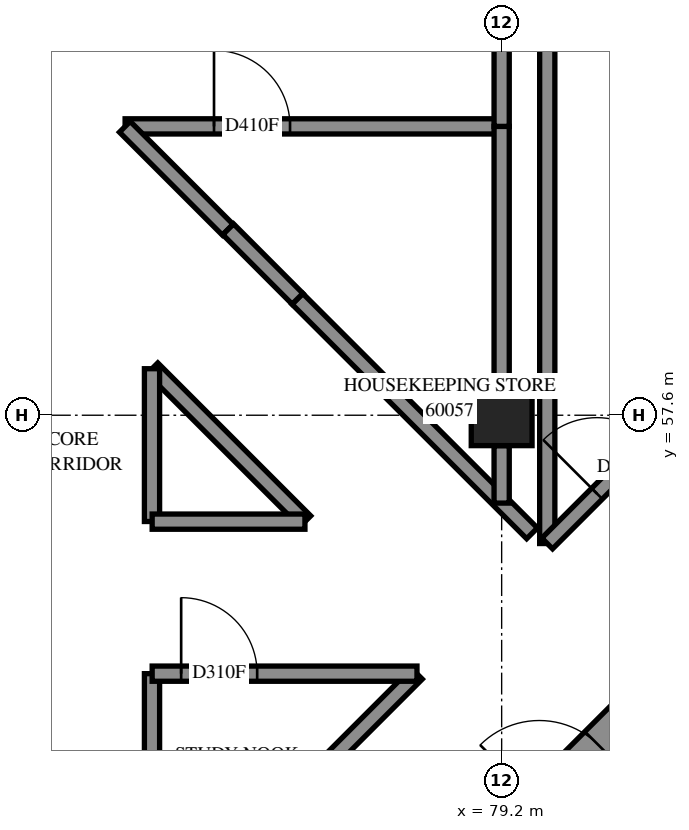
"""IFC4 building model, lengths in metres.
Left out: names, types, materials, properties, quantities, classifications, styles, units other than length and angle.
Written with IfcOpenShell. Run it as: python <this file> out.ifc"""

import sys

from ifc_helpers import new_model, si_unit, direction, frame, frame_2d, origin, origin_2d, place, context, subcontext, project, spatial, rectangle, extrude, element, fill, save


model = new_model("IFC4")
c1 = context("Model", 3, precision=1e-05, world=origin(), true_north=direction((0.0, 1.0)))
c2 = subcontext(c1, "Body", "Model", "MODEL_VIEW")
j1 = project(units=[si_unit("LENGTHUNIT", "METRE"), si_unit("PLANEANGLEUNIT", "RADIAN")], contexts=[c1])
p1 = place(None, origin())
s1 = spatial("IfcSite", under=j1, at=p1, CompositionType="ELEMENT")
p2 = place(p1, origin())
s2 = spatial("IfcBuilding", under=s1, at=p2, CompositionType="ELEMENT")
p3 = place(p2, frame((0.0, 0.0, 220.2)))
s3 = spatial("IfcBuildingStorey", under=s2, at=p3, CompositionType="ELEMENT", Elevation=220.2)
p4 = place(p3, frame((79.2, 57.6, 0.0), z_axis=(0.0, 0.0, 1.0), x_axis=(1.0, 0.0, 0.0)))
e1 = element("IfcColumn", 1, at=p4, inside=s3, PredefinedType="COLUMN", context=c2, shape_type="SweptSolid", body=[
    extrude(rectangle(XDim=0.8, YDim=0.8, at=origin_2d()), origin(), (0.0, 0.0, 1.0), 3.1),
])
p5 = place(p3, frame((76.478, 49.267, -0.3), z_axis=(0.0, 0.0, 1.0), x_axis=(0.7071067812, 0.7071067812, 0.0)))
e2 = element("IfcWall", 2, at=p5, inside=s3, PredefinedType="SHEAR", context=c2, shape_type="SweptSolid", body=[
    extrude(rectangle(XDim=14.4, YDim=0.5, at=frame_2d((7.2, 0.0))), origin(), (0.0, 0.0, 1.0), 2.7),
])
p6 = place(p5, frame((4.55, 0.0, 0.3)))
e3 = element("IfcOpeningElement", 3, at=p6, cuts=e2, PredefinedType="OPENING", context=c2, shape_type="SweptSolid", body=[
    extrude(rectangle(XDim=1.1, YDim=2.1, at=frame_2d((0.55, 1.05))), frame((0.0, 0.26, 0.0), z_axis=(0.0, -1.0, 0.0), x_axis=(1.0, 0.0, 0.0)), (0.0, 0.0, 1.0), 0.52),
])
p7 = place(p5, frame((11.35, 0.0, 0.3)))
e4 = element("IfcOpeningElement", 4, at=p7, cuts=e2, PredefinedType="OPENING", context=c2, shape_type="SweptSolid", body=[
    extrude(rectangle(XDim=1.1, YDim=2.1, at=frame_2d((0.55, 1.05))), frame((0.0, 0.26, 0.0), z_axis=(0.0, -1.0, 0.0), x_axis=(1.0, 0.0, 0.0)), (0.0, 0.0, 1.0), 0.52),
])
p8 = place(p3, frame((79.8, 55.912, 0.0), z_axis=(0.0, 0.0, 1.0), x_axis=(0.0, 1.0, 0.0)))
e5 = element("IfcWall", 5, at=p8, inside=s3, PredefinedType="PARTITIONING", context=c2, shape_type="SweptSolid", body=[
    extrude(rectangle(XDim=11.596, YDim=0.2, at=frame_2d((5.798, 0.0))), origin(), (0.0, 0.0, 1.0), 3.1),
])
p9 = place(p3, frame((79.799, 55.913, 0.0), z_axis=(0.0, 0.0, 1.0), x_axis=(0.7071067812, 0.7071067812, 0.0)))
e6 = element("IfcWall", 6, at=p9, inside=s3, PredefinedType="PARTITIONING", context=c2, shape_type="SweptSolid", body=[
    extrude(rectangle(XDim=9.95, YDim=0.2, at=frame_2d((4.975, 0.0))), origin(), (0.0, 0.0, 1.0), 3.1),
])
p10 = place(p9, frame((0.927, 0.0, 0.0)))
e7 = element("IfcOpeningElement", 7, at=p10, cuts=e6, PredefinedType="OPENING", context=c2, shape_type="SweptSolid", body=[
    extrude(rectangle(XDim=1.0, YDim=2.1, at=frame_2d((0.5, 1.05))), frame((0.0, 0.11, 0.0), z_axis=(0.0, -1.0, 0.0), x_axis=(1.0, 0.0, 0.0)), (0.0, 0.0, 1.0), 0.22),
])
p11 = place(p3, frame((74.246, 61.4, 0.0), z_axis=(0.0, 0.0, 1.0), x_axis=(1.0, 0.0, 0.0)))
e8 = element("IfcWall", 8, at=p11, inside=s3, PredefinedType="PARTITIONING", context=c2, shape_type="SweptSolid", body=[
    extrude(rectangle(XDim=4.954, YDim=0.2, at=frame_2d((2.477, 0.0))), origin(), (0.0, 0.0, 1.0), 3.1),
])
p12 = place(p11, frame((1.17, 0.0, 0.0)))
e9 = element("IfcOpeningElement", 9, at=p12, cuts=e8, PredefinedType="OPENING", context=c2, shape_type="SweptSolid", body=[
    extrude(rectangle(XDim=1.0, YDim=2.1, at=frame_2d((0.5, 1.05))), frame((0.0, 0.11, 0.0), z_axis=(0.0, -1.0, 0.0), x_axis=(1.0, 0.0, 0.0)), (0.0, 0.0, 1.0), 0.22),
])
p13 = place(p3, frame((74.601, 50.715, 0.0), z_axis=(0.0, 0.0, 1.0), x_axis=(0.7071067812, 0.7071067812, 0.0)))
e10 = element("IfcWall", 10, at=p13, inside=s3, PredefinedType="PARTITIONING", context=c2, shape_type="SweptSolid", body=[
    extrude(rectangle(XDim=4.927, YDim=0.2, at=frame_2d((2.464, 0.0))), origin(), (0.0, 0.0, 1.0), 3.1),
])
p14 = place(p3, frame((76.513, 59.131, 0.0), z_axis=(0.0, 0.0, 1.0), x_axis=(0.7073587997, -0.7068546728, 0.0)))
e11 = element("IfcWall", 11, at=p14, inside=s3, PredefinedType="PARTITIONING", context=c2, shape_type="SweptSolid", body=[
    extrude(rectangle(XDim=4.364, YDim=0.2, at=frame_2d((2.182, 0.0))), origin(), (0.0, 0.0, 1.0), 3.1),
])
p15 = place(p3, frame((74.6, 50.714, 0.0), z_axis=(0.0, 0.0, 1.0), x_axis=(0.0, 1.0, 0.0)))
e12 = element("IfcWall", 12, at=p15, inside=s3, PredefinedType="PARTITIONING", context=c2, shape_type="SweptSolid", body=[
    extrude(rectangle(XDim=3.486, YDim=0.2, at=frame_2d((1.743, 0.0))), origin(), (0.0, 0.0, 1.0), 3.1),
])
p16 = place(p3, frame((74.602, 54.2, 0.0), z_axis=(0.0, 0.0, 1.0), x_axis=(1.0, 0.0, 0.0)))
e13 = element("IfcWall", 13, at=p16, inside=s3, PredefinedType="PARTITIONING", context=c2, shape_type="SweptSolid", body=[
    extrude(rectangle(XDim=3.484, YDim=0.2, at=frame_2d((1.742, 0.0))), origin(), (0.0, 0.0, 1.0), 3.1),
])
p17 = place(p16, frame((0.382, 0.0, 0.0)))
e14 = element("IfcOpeningElement", 14, at=p17, cuts=e13, PredefinedType="OPENING", context=c2, shape_type="SweptSolid", body=[
    extrude(rectangle(XDim=1.0, YDim=2.1, at=frame_2d((0.5, 1.05))), frame((0.0, 0.11, 0.0), z_axis=(0.0, -1.0, 0.0), x_axis=(1.0, 0.0, 0.0)), (0.0, 0.0, 1.0), 0.22),
])
p18 = place(p3, frame((79.2, 58.0, 0.0), z_axis=(0.0, 0.0, 1.0), x_axis=(0.0, 1.0, 0.0)))
e15 = element("IfcWall", 15, at=p18, inside=s3, PredefinedType="PARTITIONING", context=c2, shape_type="SweptSolid", body=[
    extrude(rectangle(XDim=3.4, YDim=0.2, at=frame_2d((1.7, 0.0))), origin(), (0.0, 0.0, 1.0), 3.1),
])
p19 = place(p3, frame((74.606, 58.218, 0.0), z_axis=(0.0, 0.0, 1.0), x_axis=(0.7071067812, -0.7071067812, 0.0)))
e16 = element("IfcWall", 16, at=p19, inside=s3, PredefinedType="PARTITIONING", context=c2, shape_type="SweptSolid", body=[
    extrude(rectangle(XDim=2.845, YDim=0.2, at=frame_2d((1.423, 0.0))), origin(), (0.0, 0.0, 1.0), 3.1),
])
for number, where, z_axis, x_axis in (
    (17, (74.6, 56.202, 0.0), (0.0, 0.0, 1.0), (0.0, 1.0, 0.0)),
    (18, (74.602, 56.2, 0.0), (0.0, 0.0, 1.0), (1.0, 0.0, 0.0)),
):
    element("IfcWall", number, at=place(p3, frame(where, z_axis=z_axis, x_axis=x_axis)), inside=s3, PredefinedType="PARTITIONING", context=c2, shape_type="SweptSolid", body=[
        extrude(rectangle(XDim=2.01, YDim=0.2, at=frame_2d((1.005, 0.0))), origin(), (0.0, 0.0, 1.0), 3.1),
    ])
p20 = place(p3, frame((79.2, 61.4, 0.0), z_axis=(0.0, 0.0, 1.0), x_axis=(0.0, 1.0, 0.0)))
e19 = element("IfcWall", 19, at=p20, inside=s3, PredefinedType="PARTITIONING", context=c2, shape_type="SweptSolid", body=[
    extrude(rectangle(XDim=2.0, YDim=0.2, at=frame_2d((1.0, 0.0))), origin(), (0.0, 0.0, 1.0), 3.1),
])
p21 = place(p3, frame((74.243, 61.395, 0.0), z_axis=(0.0, 0.0, 1.0), x_axis=(0.7071067812, -0.7071067812, 0.0)))
e20 = element("IfcWall", 20, at=p21, inside=s3, PredefinedType="PARTITIONING", context=c2, shape_type="SweptSolid", body=[
    extrude(rectangle(XDim=1.915, YDim=0.2, at=frame_2d((0.957, 0.0))), origin(), (0.0, 0.0, 1.0), 3.1),
])
p22 = place(p3, frame((75.602, 60.046, 0.0), z_axis=(0.0, 0.0, 1.0), x_axis=(0.7063318703, -0.7078808437, 0.0)))
e21 = element("IfcWall", 21, at=p22, inside=s3, PredefinedType="PARTITIONING", context=c2, shape_type="SweptSolid", body=[
    extrude(rectangle(XDim=1.291, YDim=0.2, at=frame_2d((0.646, 0.0))), origin(), (0.0, 0.0, 1.0), 3.1),
])
p23 = place(p3, frame((79.2, 56.444, 0.0), z_axis=(0.0, 0.0, 1.0), x_axis=(0.0, 1.0, 0.0)))
e22 = element("IfcWall", 22, at=p23, inside=s3, PredefinedType="PARTITIONING", context=c2, shape_type="SweptSolid", body=[
    extrude(rectangle(XDim=0.756, YDim=0.2, at=frame_2d((0.378, 0.0))), origin(), (0.0, 0.0, 1.0), 3.1),
])
p24 = place(p6, origin())
e23 = element("IfcDoor", 23, at=p24, inside=s3, OperationType="DOUBLE_DOOR_SINGLE_SWING", PredefinedType="DOOR", context=c2, shape_type="SweptSolid", body=[
    extrude(rectangle(XDim=1.1, YDim=2.1, at=frame_2d((0.55, 1.05))), frame((0.0, 0.025, 0.0), z_axis=(0.0, -1.0, 0.0), x_axis=(1.0, 0.0, 0.0)), (0.0, 0.0, 1.0), 0.05),
])
fill(e3, e23)
p25 = place(p17, origin())
e24 = element("IfcDoor", 24, at=p25, inside=s3, OperationType="SINGLE_SWING_RIGHT", PredefinedType="DOOR", context=c2, shape_type="SweptSolid", body=[
    extrude(rectangle(XDim=1.0, YDim=2.1, at=frame_2d((0.5, 1.05))), frame((0.0, 0.025, 0.0), z_axis=(0.0, -1.0, 0.0), x_axis=(1.0, 0.0, 0.0)), (0.0, 0.0, 1.0), 0.05),
])
fill(e14, e24)
p26 = place(p12, origin())
e25 = element("IfcDoor", 25, at=p26, inside=s3, OperationType="SINGLE_SWING_RIGHT", PredefinedType="DOOR", context=c2, shape_type="SweptSolid", body=[
    extrude(rectangle(XDim=1.0, YDim=2.1, at=frame_2d((0.5, 1.05))), frame((0.0, 0.025, 0.0), z_axis=(0.0, -1.0, 0.0), x_axis=(1.0, 0.0, 0.0)), (0.0, 0.0, 1.0), 0.05),
])
fill(e9, e25)
p27 = place(p10, origin())
e26 = element("IfcDoor", 26, at=p27, inside=s3, OperationType="SINGLE_SWING_RIGHT", PredefinedType="DOOR", context=c2, shape_type="SweptSolid", body=[
    extrude(rectangle(XDim=1.0, YDim=2.1, at=frame_2d((0.5, 1.05))), frame((0.0, 0.025, 0.0), z_axis=(0.0, -1.0, 0.0), x_axis=(1.0, 0.0, 0.0)), (0.0, 0.0, 1.0), 0.05),
])
fill(e7, e26)
save(model, sys.argv[1])
